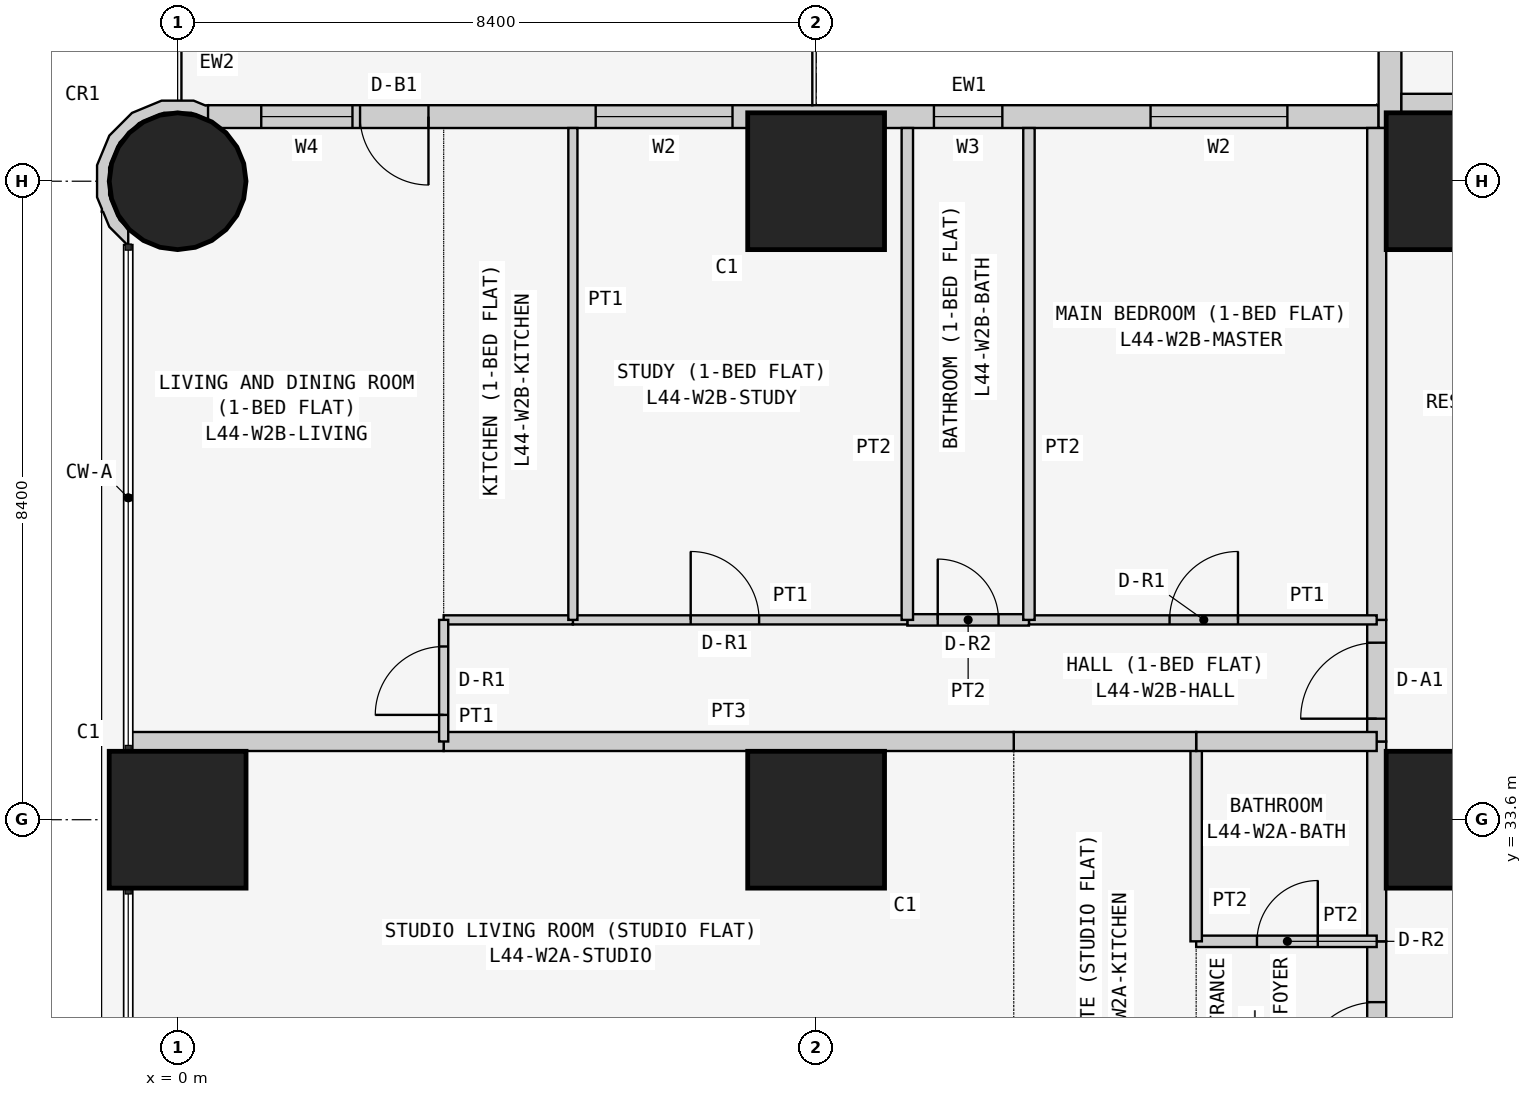
"""IFC4 building model, lengths in metres.
Left out: names, types, materials, properties, quantities, classifications, styles, units other than length and angle.
Written with IfcOpenShell. Run it as: python <this file> out.ifc"""

import sys

from ifc_helpers import new_model, si_unit, direction, frame, frame_2d, origin, origin_2d, place, context, subcontext, project, spatial, polyline, rectangle, circle, outline, extrude, element, fill, save


model = new_model("IFC4")
c1 = context("Model", 3, precision=1e-05, world=origin(), true_north=direction((0.0, 1.0)))
c2 = subcontext(c1, "Body", "Model", "MODEL_VIEW")
j1 = project(units=[si_unit("LENGTHUNIT", "METRE"), si_unit("PLANEANGLEUNIT", "RADIAN")], contexts=[c1])
p1 = place(None, origin())
s1 = spatial("IfcSite", under=j1, at=p1, CompositionType="ELEMENT")
p2 = place(p1, origin())
s2 = spatial("IfcBuilding", under=s1, at=p2, CompositionType="ELEMENT")
p3 = place(p2, frame((0.0, 0.0, 170.1)))
s3 = spatial("IfcBuildingStorey", under=s2, at=p3, CompositionType="ELEMENT", Elevation=170.1)
p4 = place(p3, frame((0.0, 33.6, 0.0), z_axis=(0.0, 0.0, 1.0), x_axis=(1.0, 0.0, 0.0)))
e1 = element("IfcColumn", 1, at=p4, inside=s3, PredefinedType="COLUMN", context=c2, shape_type="SweptSolid", body=[
    extrude(rectangle(XDim=1.8, YDim=1.8, at=origin_2d()), origin(), (0.0, 0.0, 1.0), 3.6),
])
p5 = place(p3, frame((0.0, 42.0, 0.0), z_axis=(0.0, 0.0, 1.0), x_axis=(1.0, 0.0, 0.0)))
e2 = element("IfcColumn", 2, at=p5, inside=s3, PredefinedType="COLUMN", context=c2, shape_type="SweptSolid", body=[
    extrude(circle(Radius=0.9, at=origin_2d()), origin(), (0.0, 0.0, 1.0), 3.6),
])
for number, where, z_axis, x_axis in (
    (3, (8.4, 33.6, 0.0), (0.0, 0.0, 1.0), (1.0, 0.0, 0.0)),
    (4, (8.4, 42.0, 0.0), (0.0, 0.0, 1.0), (1.0, 0.0, 0.0)),
    (5, (16.8, 33.6, 0.0), (0.0, 0.0, 1.0), (1.0, 0.0, 0.0)),
    (6, (16.8, 42.0, 0.0), (0.0, 0.0, 1.0), (1.0, 0.0, 0.0)),
):
    element("IfcColumn", number, at=place(p3, frame(where, z_axis=z_axis, x_axis=x_axis)), inside=s3, PredefinedType="COLUMN", context=c2, shape_type="SweptSolid", body=[
        extrude(rectangle(XDim=1.8, YDim=1.8, at=origin_2d()), origin(), (0.0, 0.0, 1.0), 3.6),
    ])
p6 = place(p3, frame((15.8, 42.85, 0.0), z_axis=(0.0, 0.0, 1.0), x_axis=(-1.0, 0.0, 0.0)))
e7 = element("IfcWall", 7, at=p6, inside=s3, PredefinedType="SOLIDWALL", context=c2, shape_type="SweptSolid", body=[
    extrude(rectangle(XDim=15.4, YDim=0.3, at=frame_2d((7.7, 0.0))), origin(), (0.0, 0.0, 1.0), 3.45),
])
p7 = place(p6, frame((1.2, 0.0, 0.9)))
e8 = element("IfcOpeningElement", 8, at=p7, cuts=e7, PredefinedType="OPENING", context=c2, shape_type="SweptSolid", body=[
    extrude(rectangle(XDim=1.8, YDim=1.5, at=frame_2d((0.9, 0.75))), frame((0.0, 0.16, 0.0), z_axis=(0.0, -1.0, 0.0), x_axis=(1.0, 0.0, 0.0)), (0.0, 0.0, 1.0), 0.32),
])
p8 = place(p6, frame((4.95, 0.0, 1.5)))
e9 = element("IfcOpeningElement", 9, at=p8, cuts=e7, PredefinedType="OPENING", context=c2, shape_type="SweptSolid", body=[
    extrude(rectangle(XDim=0.9, YDim=0.7, at=frame_2d((0.45, 0.35))), frame((0.0, 0.16, 0.0), z_axis=(0.0, -1.0, 0.0), x_axis=(1.0, 0.0, 0.0)), (0.0, 0.0, 1.0), 0.32),
])
p9 = place(p6, frame((8.5, 0.0, 0.9)))
e10 = element("IfcOpeningElement", 10, at=p9, cuts=e7, PredefinedType="OPENING", context=c2, shape_type="SweptSolid", body=[
    extrude(rectangle(XDim=1.8, YDim=1.5, at=frame_2d((0.9, 0.75))), frame((0.0, 0.16, 0.0), z_axis=(0.0, -1.0, 0.0), x_axis=(1.0, 0.0, 0.0)), (0.0, 0.0, 1.0), 0.32),
])
p10 = place(p6, frame((12.5, 0.0, 0.0)))
e11 = element("IfcOpeningElement", 11, at=p10, cuts=e7, PredefinedType="OPENING", context=c2, shape_type="SweptSolid", body=[
    extrude(rectangle(XDim=0.9, YDim=2.4, at=frame_2d((0.45, 1.2))), frame((0.0, 0.16, 0.0), z_axis=(0.0, -1.0, 0.0), x_axis=(1.0, 0.0, 0.0)), (0.0, 0.0, 1.0), 0.32),
])
p11 = place(p6, frame((13.5, 0.0, 0.9)))
e12 = element("IfcOpeningElement", 12, at=p11, cuts=e7, PredefinedType="OPENING", context=c2, shape_type="SweptSolid", body=[
    extrude(rectangle(XDim=1.2, YDim=1.5, at=frame_2d((0.6, 0.75))), frame((0.0, 0.16, 0.0), z_axis=(0.0, -1.0, 0.0), x_axis=(1.0, 0.0, 0.0)), (0.0, 0.0, 1.0), 0.32),
])
p12 = place(p3, frame((15.95, 50.0, 0.0), z_axis=(0.0, 0.0, 1.0), x_axis=(0.0, -1.0, 0.0)))
e13 = element("IfcWall", 13, at=p12, inside=s3, PredefinedType="SOLIDWALL", context=c2, shape_type="SweptSolid", body=[
    extrude(rectangle(XDim=7.3, YDim=0.3, at=frame_2d((3.65, 0.0))), origin(), (0.0, 0.0, 1.0), 3.45),
])
p13 = place(p12, frame((3.1, 0.0, 0.9)))
e14 = element("IfcOpeningElement", 14, at=p13, cuts=e13, PredefinedType="OPENING", context=c2, shape_type="SweptSolid", body=[
    extrude(rectangle(XDim=2.4, YDim=1.5, at=frame_2d((1.2, 0.75))), frame((0.0, 0.16, 0.0), z_axis=(0.0, -1.0, 0.0), x_axis=(1.0, 0.0, 0.0)), (0.0, 0.0, 1.0), 0.32),
])
p14 = place(p12, frame((0.75, 0.0, 0.9)))
e15 = element("IfcOpeningElement", 15, at=p14, cuts=e13, PredefinedType="OPENING", context=c2, shape_type="SweptSolid", body=[
    extrude(rectangle(XDim=1.2, YDim=1.5, at=frame_2d((0.6, 0.75))), frame((0.0, 0.16, 0.0), z_axis=(0.0, -1.0, 0.0), x_axis=(1.0, 0.0, 0.0)), (0.0, 0.0, 1.0), 0.32),
])
p15 = place(p3, frame((0.364, 42.91, 0.0), z_axis=(0.0, 0.0, 1.0), x_axis=(-0.926129809145, 0.377204953059, 0.0)))
e16 = element("IfcWall", 16, at=p15, inside=s3, PredefinedType="SOLIDWALL", context=c2, shape_type="SweptSolid", body=[
    extrude(outline(polyline([(0.36, 1.803), (0.509, 1.741), (0.761, 1.486), (0.896, 1.154), (0.894, 0.795), (0.755, 0.465), (0.5, 0.213), (0.168, 0.078), (-0.1, 0.08), (0.001, -0.097), (0.03, -0.08), (0.199, -0.081), (0.589, 0.078), (0.889, 0.374), (1.053, 0.763), (1.055, 1.185), (0.896, 1.575), (0.778, 1.695), (0.769, 1.728), (0.75, 1.723), (0.6, 1.875), (0.295, 2.003), (0.281, 1.998), (0.36, 1.803)])), origin(), (0.0, 0.0, 1.0), 3.45),
])
p16 = place(p3, frame((16.1, 43.025, 0.0), z_axis=(0.0, 0.0, 1.0), x_axis=(1.0, 0.0, 0.0)))
e17 = element("IfcWall", 17, at=p16, inside=s3, PredefinedType="PARTITIONING", context=c2, shape_type="SweptSolid", body=[
    extrude(rectangle(XDim=6.471, YDim=0.25, at=frame_2d((3.235, 0.0))), origin(), (0.0, 0.0, 1.0), 3.45),
])
p17 = place(p3, frame((15.775, 29.4, 0.0), z_axis=(0.0, 0.0, 1.0), x_axis=(0.0, 1.0, 0.0)))
e18 = element("IfcWall", 18, at=p17, inside=s3, PredefinedType="PARTITIONING", context=c2, shape_type="SweptSolid", body=[
    extrude(rectangle(XDim=2.6, YDim=0.25, at=frame_2d((1.3, 0.0))), origin(), (0.0, 0.0, 1.0), 3.45),
])
p18 = place(p17, frame((0.8, 0.0, 0.0)))
e19 = element("IfcOpeningElement", 19, at=p18, cuts=e18, PredefinedType="OPENING", context=c2, shape_type="SweptSolid", body=[
    extrude(rectangle(XDim=1.0, YDim=2.1, at=frame_2d((0.5, 1.05))), frame((0.0, 0.135, 0.0), z_axis=(0.0, -1.0, 0.0), x_axis=(1.0, 0.0, 0.0)), (0.0, 0.0, 1.0), 0.27),
])
p19 = place(p3, frame((15.775, 32.0, 0.0), z_axis=(0.0, 0.0, 1.0), x_axis=(0.0, 1.0, 0.0)))
e20 = element("IfcWall", 20, at=p19, inside=s3, PredefinedType="PARTITIONING", context=c2, shape_type="SweptSolid", body=[
    extrude(rectangle(XDim=2.629, YDim=0.25, at=frame_2d((1.314, 0.0))), origin(), (0.0, 0.0, 1.0), 3.45),
])
p20 = place(p3, frame((15.775, 34.629, 0.0), z_axis=(0.0, 0.0, 1.0), x_axis=(0.0, 1.0, 0.0)))
e21 = element("IfcWall", 21, at=p20, inside=s3, PredefinedType="PARTITIONING", context=c2, shape_type="SweptSolid", body=[
    extrude(rectangle(XDim=1.6, YDim=0.25, at=frame_2d((0.8, 0.0))), origin(), (0.0, 0.0, 1.0), 3.45),
])
p21 = place(p20, frame((0.3, 0.0, 0.0)))
e22 = element("IfcOpeningElement", 22, at=p21, cuts=e21, PredefinedType="OPENING", context=c2, shape_type="SweptSolid", body=[
    extrude(rectangle(XDim=1.0, YDim=2.1, at=frame_2d((0.5, 1.05))), frame((0.0, 0.135, 0.0), z_axis=(0.0, -1.0, 0.0), x_axis=(1.0, 0.0, 0.0)), (0.0, 0.0, 1.0), 0.27),
])
p22 = place(p3, frame((15.775, 36.229, 0.0), z_axis=(0.0, 0.0, 1.0), x_axis=(0.0, 1.0, 0.0)))
e23 = element("IfcWall", 23, at=p22, inside=s3, PredefinedType="PARTITIONING", context=c2, shape_type="SweptSolid", body=[
    extrude(rectangle(XDim=6.471, YDim=0.25, at=frame_2d((3.235, 0.0))), origin(), (0.0, 0.0, 1.0), 3.45),
])
p23 = place(p3, frame((13.4, 32.0, 0.0), z_axis=(0.0, 0.0, 1.0), x_axis=(1.0, 0.0, 0.0)))
e24 = element("IfcWall", 24, at=p23, inside=s3, PredefinedType="PARTITIONING", context=c2, shape_type="SweptSolid", body=[
    extrude(rectangle(XDim=2.375, YDim=0.15, at=frame_2d((1.188, 0.0))), origin(), (0.0, 0.0, 1.0), 3.45),
])
p24 = place(p23, frame((0.8, 0.0, 0.0)))
e25 = element("IfcOpeningElement", 25, at=p24, cuts=e24, PredefinedType="OPENING", context=c2, shape_type="SweptSolid", body=[
    extrude(rectangle(XDim=0.8, YDim=2.1, at=frame_2d((0.4, 1.05))), frame((0.0, 0.085, 0.0), z_axis=(0.0, -1.0, 0.0), x_axis=(1.0, 0.0, 0.0)), (0.0, 0.0, 1.0), 0.17),
])
p25 = place(p3, frame((13.4, 32.0, 0.0), z_axis=(0.0, 0.0, 1.0), x_axis=(0.0, 1.0, 0.0)))
e26 = element("IfcWall", 26, at=p25, inside=s3, PredefinedType="PARTITIONING", context=c2, shape_type="SweptSolid", body=[
    extrude(rectangle(XDim=2.629, YDim=0.15, at=frame_2d((1.314, 0.0))), origin(), (0.0, 0.0, 1.0), 3.45),
])
p26 = place(p3, frame((13.4, 34.629, 0.0), z_axis=(0.0, 0.0, 1.0), x_axis=(1.0, 0.0, 0.0)))
e27 = element("IfcWall", 27, at=p26, inside=s3, PredefinedType="PARTITIONING", context=c2, shape_type="SweptSolid", body=[
    extrude(rectangle(XDim=2.375, YDim=0.25, at=frame_2d((1.188, 0.0))), origin(), (0.0, 0.0, 1.0), 3.45),
])
p27 = place(p3, frame((11.0, 34.629, 0.0), z_axis=(0.0, 0.0, 1.0), x_axis=(1.0, 0.0, 0.0)))
e28 = element("IfcWall", 28, at=p27, inside=s3, PredefinedType="PARTITIONING", context=c2, shape_type="SweptSolid", body=[
    extrude(rectangle(XDim=2.4, YDim=0.25, at=frame_2d((1.2, 0.0))), origin(), (0.0, 0.0, 1.0), 3.45),
])
p28 = place(p3, frame((3.5, 34.629, 0.0), z_axis=(0.0, 0.0, 1.0), x_axis=(1.0, 0.0, 0.0)))
e29 = element("IfcWall", 29, at=p28, inside=s3, PredefinedType="PARTITIONING", context=c2, shape_type="SweptSolid", body=[
    extrude(rectangle(XDim=7.5, YDim=0.25, at=frame_2d((3.75, 0.0))), origin(), (0.0, 0.0, 1.0), 3.45),
])
p29 = place(p3, frame((-0.65, 34.629, 0.0), z_axis=(0.0, 0.0, 1.0), x_axis=(1.0, 0.0, 0.0)))
e30 = element("IfcWall", 30, at=p29, inside=s3, PredefinedType="PARTITIONING", context=c2, shape_type="SweptSolid", body=[
    extrude(rectangle(XDim=4.15, YDim=0.25, at=frame_2d((2.075, 0.0))), origin(), (0.0, 0.0, 1.0), 3.45),
])
p30 = place(p3, frame((11.2, 36.229, 0.0), z_axis=(0.0, 0.0, 1.0), x_axis=(1.0, 0.0, 0.0)))
e31 = element("IfcWall", 31, at=p30, inside=s3, PredefinedType="PARTITIONING", context=c2, shape_type="SweptSolid", body=[
    extrude(rectangle(XDim=4.575, YDim=0.12, at=frame_2d((2.288, 0.0))), origin(), (0.0, 0.0, 1.0), 3.45),
])
p31 = place(p30, frame((1.85, 0.0, 0.0)))
e32 = element("IfcOpeningElement", 32, at=p31, cuts=e31, PredefinedType="OPENING", context=c2, shape_type="SweptSolid", body=[
    extrude(rectangle(XDim=0.9, YDim=2.1, at=frame_2d((0.45, 1.05))), frame((0.0, 0.07, 0.0), z_axis=(0.0, -1.0, 0.0), x_axis=(1.0, 0.0, 0.0)), (0.0, 0.0, 1.0), 0.14),
])
p32 = place(p3, frame((9.6, 36.229, 0.0), z_axis=(0.0, 0.0, 1.0), x_axis=(1.0, 0.0, 0.0)))
e33 = element("IfcWall", 33, at=p32, inside=s3, PredefinedType="PARTITIONING", context=c2, shape_type="SweptSolid", body=[
    extrude(rectangle(XDim=1.6, YDim=0.15, at=frame_2d((0.8, 0.0))), origin(), (0.0, 0.0, 1.0), 3.45),
])
p33 = place(p32, frame((0.4, 0.0, 0.0)))
e34 = element("IfcOpeningElement", 34, at=p33, cuts=e33, PredefinedType="OPENING", context=c2, shape_type="SweptSolid", body=[
    extrude(rectangle(XDim=0.8, YDim=2.1, at=frame_2d((0.4, 1.05))), frame((0.0, 0.085, 0.0), z_axis=(0.0, -1.0, 0.0), x_axis=(1.0, 0.0, 0.0)), (0.0, 0.0, 1.0), 0.17),
])
p34 = place(p3, frame((5.2, 36.229, 0.0), z_axis=(0.0, 0.0, 1.0), x_axis=(1.0, 0.0, 0.0)))
e35 = element("IfcWall", 35, at=p34, inside=s3, PredefinedType="PARTITIONING", context=c2, shape_type="SweptSolid", body=[
    extrude(rectangle(XDim=4.4, YDim=0.12, at=frame_2d((2.2, 0.0))), origin(), (0.0, 0.0, 1.0), 3.45),
])
p35 = place(p34, frame((1.55, 0.0, 0.0)))
e36 = element("IfcOpeningElement", 36, at=p35, cuts=e35, PredefinedType="OPENING", context=c2, shape_type="SweptSolid", body=[
    extrude(rectangle(XDim=0.9, YDim=2.1, at=frame_2d((0.45, 1.05))), frame((0.0, 0.07, 0.0), z_axis=(0.0, -1.0, 0.0), x_axis=(1.0, 0.0, 0.0)), (0.0, 0.0, 1.0), 0.14),
])
p36 = place(p3, frame((3.5, 36.229, 0.0), z_axis=(0.0, 0.0, 1.0), x_axis=(1.0, 0.0, 0.0)))
e37 = element("IfcWall", 37, at=p36, inside=s3, PredefinedType="PARTITIONING", context=c2, shape_type="SweptSolid", body=[
    extrude(rectangle(XDim=1.7, YDim=0.12, at=frame_2d((0.85, 0.0))), origin(), (0.0, 0.0, 1.0), 3.45),
])
p37 = place(p3, frame((3.5, 34.629, 0.0), z_axis=(0.0, 0.0, 1.0), x_axis=(0.0, 1.0, 0.0)))
e38 = element("IfcWall", 38, at=p37, inside=s3, PredefinedType="PARTITIONING", context=c2, shape_type="SweptSolid", body=[
    extrude(rectangle(XDim=1.6, YDim=0.12, at=frame_2d((0.8, 0.0))), origin(), (0.0, 0.0, 1.0), 3.45),
])
p38 = place(p37, frame((0.35, 0.0, 0.0)))
e39 = element("IfcOpeningElement", 39, at=p38, cuts=e38, PredefinedType="OPENING", context=c2, shape_type="SweptSolid", body=[
    extrude(rectangle(XDim=0.9, YDim=2.1, at=frame_2d((0.45, 1.05))), frame((0.0, 0.07, 0.0), z_axis=(0.0, -1.0, 0.0), x_axis=(1.0, 0.0, 0.0)), (0.0, 0.0, 1.0), 0.14),
])
for number, where, z_axis, x_axis in (
    (40, (11.2, 36.229, 0.0), (0.0, 0.0, 1.0), (0.0, 1.0, 0.0)),
    (41, (9.6, 36.229, 0.0), (0.0, 0.0, 1.0), (0.0, 1.0, 0.0)),
):
    element("IfcWall", number, at=place(p3, frame(where, z_axis=z_axis, x_axis=x_axis)), inside=s3, PredefinedType="PARTITIONING", context=c2, shape_type="SweptSolid", body=[
        extrude(rectangle(XDim=6.471, YDim=0.15, at=frame_2d((3.235, 0.0))), origin(), (0.0, 0.0, 1.0), 3.45),
    ])
p39 = place(p3, frame((5.2, 36.229, 0.0), z_axis=(0.0, 0.0, 1.0), x_axis=(0.0, 1.0, 0.0)))
e42 = element("IfcWall", 42, at=p39, inside=s3, PredefinedType="PARTITIONING", context=c2, shape_type="SweptSolid", body=[
    extrude(rectangle(XDim=6.471, YDim=0.12, at=frame_2d((3.235, 0.0))), origin(), (0.0, 0.0, 1.0), 3.45),
])
p40 = place(p7, origin())
e43 = element("IfcWindow", 43, at=p40, inside=s3, PartitioningType="SINGLE_PANEL", PredefinedType="WINDOW", context=c2, shape_type="SweptSolid", body=[
    extrude(rectangle(XDim=1.8, YDim=1.5, at=frame_2d((0.9, 0.75))), frame((0.0, 0.03, 0.0), z_axis=(0.0, -1.0, 0.0), x_axis=(1.0, 0.0, 0.0)), (0.0, 0.0, 1.0), 0.06),
])
fill(e8, e43)
p41 = place(p8, origin())
e44 = element("IfcWindow", 44, at=p41, inside=s3, PartitioningType="SINGLE_PANEL", PredefinedType="WINDOW", context=c2, shape_type="SweptSolid", body=[
    extrude(rectangle(XDim=0.9, YDim=0.7, at=frame_2d((0.45, 0.35))), frame((0.0, 0.03, 0.0), z_axis=(0.0, -1.0, 0.0), x_axis=(1.0, 0.0, 0.0)), (0.0, 0.0, 1.0), 0.06),
])
fill(e9, e44)
p42 = place(p9, origin())
e45 = element("IfcWindow", 45, at=p42, inside=s3, PartitioningType="SINGLE_PANEL", PredefinedType="WINDOW", context=c2, shape_type="SweptSolid", body=[
    extrude(rectangle(XDim=1.8, YDim=1.5, at=frame_2d((0.9, 0.75))), frame((0.0, 0.03, 0.0), z_axis=(0.0, -1.0, 0.0), x_axis=(1.0, 0.0, 0.0)), (0.0, 0.0, 1.0), 0.06),
])
fill(e10, e45)
p43 = place(p10, origin())
e46 = element("IfcDoor", 46, at=p43, inside=s3, OperationType="SINGLE_SWING_LEFT", PredefinedType="DOOR", context=c2, shape_type="SweptSolid", body=[
    extrude(rectangle(XDim=0.9, YDim=2.4, at=frame_2d((0.45, 1.2))), frame((0.0, 0.025, 0.0), z_axis=(0.0, -1.0, 0.0), x_axis=(1.0, 0.0, 0.0)), (0.0, 0.0, 1.0), 0.05),
])
fill(e11, e46)
p44 = place(p11, origin())
e47 = element("IfcWindow", 47, at=p44, inside=s3, PartitioningType="SINGLE_PANEL", PredefinedType="WINDOW", context=c2, shape_type="SweptSolid", body=[
    extrude(rectangle(XDim=1.2, YDim=1.5, at=frame_2d((0.6, 0.75))), frame((0.0, 0.03, 0.0), z_axis=(0.0, -1.0, 0.0), x_axis=(1.0, 0.0, 0.0)), (0.0, 0.0, 1.0), 0.06),
])
fill(e12, e47)
p45 = place(p18, origin())
e48 = element("IfcDoor", 48, at=p45, inside=s3, OperationType="SINGLE_SWING_LEFT", PredefinedType="DOOR", context=c2, shape_type="SweptSolid", body=[
    extrude(rectangle(XDim=1.0, YDim=2.1, at=frame_2d((0.5, 1.05))), frame((0.0, 0.025, 0.0), z_axis=(0.0, -1.0, 0.0), x_axis=(1.0, 0.0, 0.0)), (0.0, 0.0, 1.0), 0.05),
])
fill(e19, e48)
p46 = place(p24, origin())
e49 = element("IfcDoor", 49, at=p46, inside=s3, OperationType="SINGLE_SWING_RIGHT", PredefinedType="DOOR", context=c2, shape_type="SweptSolid", body=[
    extrude(rectangle(XDim=0.8, YDim=2.1, at=frame_2d((0.4, 1.05))), frame((0.0, 0.025, 0.0), z_axis=(0.0, -1.0, 0.0), x_axis=(1.0, 0.0, 0.0)), (0.0, 0.0, 1.0), 0.05),
])
fill(e25, e49)
p47 = place(p21, origin())
e50 = element("IfcDoor", 50, at=p47, inside=s3, OperationType="SINGLE_SWING_LEFT", PredefinedType="DOOR", context=c2, shape_type="SweptSolid", body=[
    extrude(rectangle(XDim=1.0, YDim=2.1, at=frame_2d((0.5, 1.05))), frame((0.0, 0.025, 0.0), z_axis=(0.0, -1.0, 0.0), x_axis=(1.0, 0.0, 0.0)), (0.0, 0.0, 1.0), 0.05),
])
fill(e22, e50)
p48 = place(p31, origin())
e51 = element("IfcDoor", 51, at=p48, inside=s3, OperationType="SINGLE_SWING_RIGHT", PredefinedType="DOOR", context=c2, shape_type="SweptSolid", body=[
    extrude(rectangle(XDim=0.9, YDim=2.1, at=frame_2d((0.45, 1.05))), frame((0.0, 0.025, 0.0), z_axis=(0.0, -1.0, 0.0), x_axis=(1.0, 0.0, 0.0)), (0.0, 0.0, 1.0), 0.05),
])
fill(e32, e51)
p49 = place(p33, origin())
e52 = element("IfcDoor", 52, at=p49, inside=s3, OperationType="SINGLE_SWING_LEFT", PredefinedType="DOOR", context=c2, shape_type="SweptSolid", body=[
    extrude(rectangle(XDim=0.8, YDim=2.1, at=frame_2d((0.4, 1.05))), frame((0.0, 0.025, 0.0), z_axis=(0.0, -1.0, 0.0), x_axis=(1.0, 0.0, 0.0)), (0.0, 0.0, 1.0), 0.05),
])
fill(e34, e52)
p50 = place(p35, origin())
e53 = element("IfcDoor", 53, at=p50, inside=s3, OperationType="SINGLE_SWING_LEFT", PredefinedType="DOOR", context=c2, shape_type="SweptSolid", body=[
    extrude(rectangle(XDim=0.9, YDim=2.1, at=frame_2d((0.45, 1.05))), frame((0.0, 0.025, 0.0), z_axis=(0.0, -1.0, 0.0), x_axis=(1.0, 0.0, 0.0)), (0.0, 0.0, 1.0), 0.05),
])
fill(e36, e53)
p51 = place(p38, origin())
e54 = element("IfcDoor", 54, at=p51, inside=s3, OperationType="SINGLE_SWING_LEFT", PredefinedType="DOOR", context=c2, shape_type="SweptSolid", body=[
    extrude(rectangle(XDim=0.9, YDim=2.1, at=frame_2d((0.45, 1.05))), frame((0.0, 0.025, 0.0), z_axis=(0.0, -1.0, 0.0), x_axis=(1.0, 0.0, 0.0)), (0.0, 0.0, 1.0), 0.05),
])
fill(e39, e54)
save(model, sys.argv[1])
